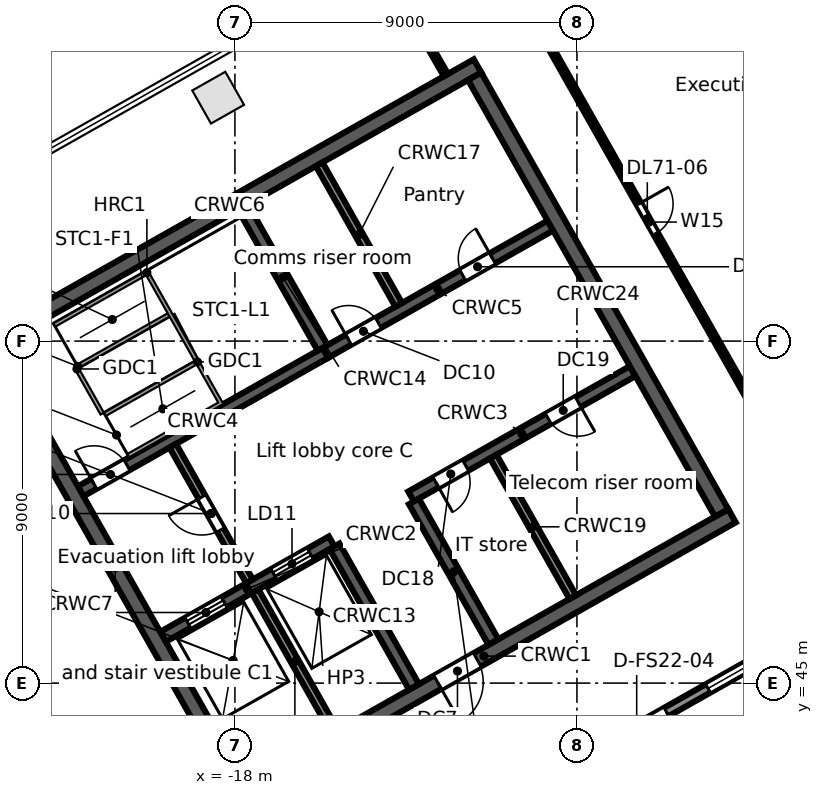
"""IFC4 building model, lengths in metres.
Left out: names, types, materials, properties, quantities, classifications, styles, units other than length and angle.
Written with IfcOpenShell. Run it as: python <this file> out.ifc"""

import sys

from ifc_helpers import new_model, si_unit, direction, frame, frame_2d, origin, origin_2d, place, context, subcontext, project, spatial, rectangle, extrude, element, fill, save


model = new_model("IFC4")
c1 = context("Model", 3, precision=1e-05, world=origin(), true_north=direction((0.0, 1.0)))
c2 = subcontext(c1, "Body", "Model", "MODEL_VIEW")
j1 = project(units=[si_unit("LENGTHUNIT", "METRE"), si_unit("PLANEANGLEUNIT", "RADIAN")], contexts=[c1])
p1 = place(None, origin())
s1 = spatial("IfcSite", under=j1, at=p1, CompositionType="ELEMENT")
p2 = place(p1, origin())
s2 = spatial("IfcBuilding", under=s1, at=p2, CompositionType="ELEMENT")
p3 = place(p2, frame((0.0, 0.0, 316.5)))
s3 = spatial("IfcBuildingStorey", under=s2, at=p3, CompositionType="ELEMENT", Elevation=316.5)
p4 = place(p3, frame((-18.441, 60.406, 0.0), z_axis=(0.0, 0.0, 1.0), x_axis=(-0.87035569594, -0.492423560103, 0.0)))
e1 = element("IfcColumn", 1, at=p4, inside=s3, PredefinedType="COLUMN", context=c2, shape_type="SweptSolid", body=[
    extrude(rectangle(XDim=1.0, YDim=1.0, at=origin_2d()), origin(), (0.0, 0.0, 1.0), 3.8),
])
p5 = place(p3, frame((-3.017, 46.293, 0.0), z_axis=(0.0, 0.0, 1.0), x_axis=(-0.870355474887, -0.492423950812, 0.0)))
e2 = element("IfcWall", 2, at=p5, inside=s3, PredefinedType="STANDARD", context=c2, shape_type="SweptSolid", body=[
    extrude(rectangle(XDim=40.34, YDim=0.25, at=frame_2d((20.17, 0.0))), origin(), (0.0, 0.0, 1.0), 3.52),
])
p6 = place(p5, frame((37.428, 0.0, 0.8)))
e3 = element("IfcOpeningElement", 3, at=p6, cuts=e2, PredefinedType="OPENING", context=c2, shape_type="SweptSolid", body=[
    extrude(rectangle(XDim=2.4, YDim=2.2, at=frame_2d((1.2, 1.1))), frame((0.0, 0.135, 0.0), z_axis=(0.0, -1.0, 0.0), x_axis=(1.0, 0.0, 0.0)), (0.0, 0.0, 1.0), 0.27),
])
p7 = place(p5, frame((34.372, 0.0, 0.0)))
e4 = element("IfcOpeningElement", 4, at=p7, cuts=e2, PredefinedType="OPENING", context=c2, shape_type="SweptSolid", body=[
    extrude(rectangle(XDim=1.8, YDim=2.4, at=frame_2d((0.9, 1.2))), frame((0.0, 0.135, 0.0), z_axis=(0.0, -1.0, 0.0), x_axis=(1.0, 0.0, 0.0)), (0.0, 0.0, 1.0), 0.27),
])
p8 = place(p5, frame((30.716, 0.0, 0.8)))
e5 = element("IfcOpeningElement", 5, at=p8, cuts=e2, PredefinedType="OPENING", context=c2, shape_type="SweptSolid", body=[
    extrude(rectangle(XDim=2.4, YDim=2.2, at=frame_2d((1.2, 1.1))), frame((0.0, 0.135, 0.0), z_axis=(0.0, -1.0, 0.0), x_axis=(1.0, 0.0, 0.0)), (0.0, 0.0, 1.0), 0.27),
])
p9 = place(p5, frame((27.36, 0.0, 0.8)))
e6 = element("IfcOpeningElement", 6, at=p9, cuts=e2, PredefinedType="OPENING", context=c2, shape_type="SweptSolid", body=[
    extrude(rectangle(XDim=2.4, YDim=2.2, at=frame_2d((1.2, 1.1))), frame((0.0, 0.135, 0.0), z_axis=(0.0, -1.0, 0.0), x_axis=(1.0, 0.0, 0.0)), (0.0, 0.0, 1.0), 0.27),
])
p10 = place(p5, frame((24.304, 0.0, 0.0)))
e7 = element("IfcOpeningElement", 7, at=p10, cuts=e2, PredefinedType="OPENING", context=c2, shape_type="SweptSolid", body=[
    extrude(rectangle(XDim=1.8, YDim=2.4, at=frame_2d((0.9, 1.2))), frame((0.0, 0.135, 0.0), z_axis=(0.0, -1.0, 0.0), x_axis=(1.0, 0.0, 0.0)), (0.0, 0.0, 1.0), 0.27),
])
p11 = place(p5, frame((20.648, 0.0, 0.8)))
e8 = element("IfcOpeningElement", 8, at=p11, cuts=e2, PredefinedType="OPENING", context=c2, shape_type="SweptSolid", body=[
    extrude(rectangle(XDim=2.4, YDim=2.2, at=frame_2d((1.2, 1.1))), frame((0.0, 0.135, 0.0), z_axis=(0.0, -1.0, 0.0), x_axis=(1.0, 0.0, 0.0)), (0.0, 0.0, 1.0), 0.27),
])
p12 = place(p5, frame((17.292, 0.0, 0.8)))
e9 = element("IfcOpeningElement", 9, at=p12, cuts=e2, PredefinedType="OPENING", context=c2, shape_type="SweptSolid", body=[
    extrude(rectangle(XDim=2.4, YDim=2.2, at=frame_2d((1.2, 1.1))), frame((0.0, 0.135, 0.0), z_axis=(0.0, -1.0, 0.0), x_axis=(1.0, 0.0, 0.0)), (0.0, 0.0, 1.0), 0.27),
])
p13 = place(p5, frame((14.236, 0.0, 0.0)))
e10 = element("IfcOpeningElement", 10, at=p13, cuts=e2, PredefinedType="OPENING", context=c2, shape_type="SweptSolid", body=[
    extrude(rectangle(XDim=1.8, YDim=2.4, at=frame_2d((0.9, 1.2))), frame((0.0, 0.135, 0.0), z_axis=(0.0, -1.0, 0.0), x_axis=(1.0, 0.0, 0.0)), (0.0, 0.0, 1.0), 0.27),
])
p14 = place(p5, frame((10.58, 0.0, 0.8)))
e11 = element("IfcOpeningElement", 11, at=p14, cuts=e2, PredefinedType="OPENING", context=c2, shape_type="SweptSolid", body=[
    extrude(rectangle(XDim=2.4, YDim=2.2, at=frame_2d((1.2, 1.1))), frame((0.0, 0.135, 0.0), z_axis=(0.0, -1.0, 0.0), x_axis=(1.0, 0.0, 0.0)), (0.0, 0.0, 1.0), 0.27),
])
p15 = place(p5, frame((7.224, 0.0, 0.8)))
e12 = element("IfcOpeningElement", 12, at=p15, cuts=e2, PredefinedType="OPENING", context=c2, shape_type="SweptSolid", body=[
    extrude(rectangle(XDim=2.4, YDim=2.2, at=frame_2d((1.2, 1.1))), frame((0.0, 0.135, 0.0), z_axis=(0.0, -1.0, 0.0), x_axis=(1.0, 0.0, 0.0)), (0.0, 0.0, 1.0), 0.27),
])
p16 = place(p5, frame((4.168, 0.0, 0.0)))
e13 = element("IfcOpeningElement", 13, at=p16, cuts=e2, PredefinedType="OPENING", context=c2, shape_type="SweptSolid", body=[
    extrude(rectangle(XDim=1.8, YDim=2.4, at=frame_2d((0.9, 1.2))), frame((0.0, 0.135, 0.0), z_axis=(0.0, -1.0, 0.0), x_axis=(1.0, 0.0, 0.0)), (0.0, 0.0, 1.0), 0.27),
])
p17 = place(p5, frame((0.512, 0.0, 0.8)))
e14 = element("IfcOpeningElement", 14, at=p17, cuts=e2, PredefinedType="OPENING", context=c2, shape_type="SweptSolid", body=[
    extrude(rectangle(XDim=2.4, YDim=2.2, at=frame_2d((1.2, 1.1))), frame((0.0, 0.135, 0.0), z_axis=(0.0, -1.0, 0.0), x_axis=(1.0, 0.0, 0.0)), (0.0, 0.0, 1.0), 0.27),
])
p18 = place(p3, frame((-17.975, 42.017, 0.0), z_axis=(0.0, 0.0, 1.0), x_axis=(0.87034965173, 0.492434243055, 0.0)))
e15 = element("IfcWall", 15, at=p18, inside=s3, PredefinedType="SOLIDWALL", context=c2, shape_type="SweptSolid", body=[
    extrude(rectangle(XDim=15.0, YDim=0.4, at=frame_2d((7.5, 0.0))), origin(), (0.0, 0.0, 1.0), 3.52),
])
p19 = place(p18, frame((6.1, 0.0, 0.0)))
e16 = element("IfcOpeningElement", 16, at=p19, cuts=e15, PredefinedType="OPENING", context=c2, shape_type="SweptSolid", body=[
    extrude(rectangle(XDim=1.2, YDim=2.1, at=frame_2d((0.6, 1.05))), frame((0.0, 0.21, 0.0), z_axis=(0.0, -1.0, 0.0), x_axis=(1.0, 0.0, 0.0)), (0.0, 0.0, 1.0), 0.42),
])
p20 = place(p3, frame((-19.892, 46.218, 0.0), z_axis=(0.0, 0.0, 1.0), x_axis=(0.870341639186, 0.492448404505, 0.0)))
e17 = element("IfcWall", 17, at=p20, inside=s3, PredefinedType="SOLIDWALL", context=c2, shape_type="SweptSolid", body=[
    extrude(rectangle(XDim=5.1, YDim=0.3, at=frame_2d((2.55, 0.0))), origin(), (0.0, 0.0, 1.0), 3.52),
])
p21 = place(p20, frame((0.75, 0.0, 0.0)))
e18 = element("IfcOpeningElement", 18, at=p21, cuts=e17, PredefinedType="OPENING", context=c2, shape_type="SweptSolid", body=[
    extrude(rectangle(XDim=1.1, YDim=2.1, at=frame_2d((0.55, 1.05))), frame((0.0, 0.16, 0.0), z_axis=(0.0, -1.0, 0.0), x_axis=(1.0, 0.0, 0.0)), (0.0, 0.0, 1.0), 0.32),
])
p22 = place(p20, frame((3.35, 0.0, 0.0)))
e19 = element("IfcOpeningElement", 19, at=p22, cuts=e17, PredefinedType="OPENING", context=c2, shape_type="SweptSolid", body=[
    extrude(rectangle(XDim=1.1, YDim=2.1, at=frame_2d((0.55, 1.05))), frame((0.0, 0.16, 0.0), z_axis=(0.0, -1.0, 0.0), x_axis=(1.0, 0.0, 0.0)), (0.0, 0.0, 1.0), 0.32),
])
p23 = place(p3, frame((-13.365, 49.911, 0.0), z_axis=(0.0, 0.0, 1.0), x_axis=(0.870347618718, 0.492437836272, 0.0)))
e20 = element("IfcWall", 20, at=p23, inside=s3, PredefinedType="SOLIDWALL", context=c2, shape_type="SweptSolid", body=[
    extrude(rectangle(XDim=6.7, YDim=0.3, at=frame_2d((3.35, 0.0))), origin(), (0.0, 0.0, 1.0), 3.52),
])
p24 = place(p23, frame((0.75, 0.0, 0.0)))
e21 = element("IfcOpeningElement", 21, at=p24, cuts=e20, PredefinedType="OPENING", context=c2, shape_type="SweptSolid", body=[
    extrude(rectangle(XDim=0.9, YDim=2.1, at=frame_2d((0.45, 1.05))), frame((0.0, 0.16, 0.0), z_axis=(0.0, -1.0, 0.0), x_axis=(1.0, 0.0, 0.0)), (0.0, 0.0, 1.0), 0.32),
])
p25 = place(p23, frame((4.15, 0.0, 0.0)))
e22 = element("IfcOpeningElement", 22, at=p25, cuts=e20, PredefinedType="OPENING", context=c2, shape_type="SweptSolid", body=[
    extrude(rectangle(XDim=0.9, YDim=2.1, at=frame_2d((0.45, 1.05))), frame((0.0, 0.16, 0.0), z_axis=(0.0, -1.0, 0.0), x_axis=(1.0, 0.0, 0.0)), (0.0, 0.0, 1.0), 0.32),
])
p26 = place(p3, frame((-22.059, 50.047, 0.0), z_axis=(0.0, 0.0, 1.0), x_axis=(0.87035077051, 0.49243226567, 0.0)))
e23 = element("IfcWall", 23, at=p26, inside=s3, PredefinedType="SOLIDWALL", context=c2, shape_type="SweptSolid", body=[
    extrude(rectangle(XDim=7.4, YDim=0.3, at=frame_2d((3.7, 0.0))), origin(), (0.0, 0.0, 1.0), 3.52),
])
p27 = place(p26, frame((0.4, 0.0, 0.0)))
e24 = element("IfcOpeningElement", 24, at=p27, cuts=e23, PredefinedType="OPENING", context=c2, shape_type="SweptSolid", body=[
    extrude(rectangle(XDim=1.0, YDim=2.1, at=frame_2d((0.5, 1.05))), frame((0.0, 0.16, 0.0), z_axis=(0.0, -1.0, 0.0), x_axis=(1.0, 0.0, 0.0)), (0.0, 0.0, 1.0), 0.32),
])
p28 = place(p3, frame((-15.618, 53.691, 0.0), z_axis=(0.0, 0.0, 1.0), x_axis=(0.870362830851, 0.492410948978, 0.0)))
e25 = element("IfcWall", 25, at=p28, inside=s3, PredefinedType="SOLIDWALL", context=c2, shape_type="SweptSolid", body=[
    extrude(rectangle(XDim=6.8, YDim=0.3, at=frame_2d((3.4, 0.0))), origin(), (0.0, 0.0, 1.0), 3.52),
])
p29 = place(p28, frame((0.7, 0.0, 0.0)))
e26 = element("IfcOpeningElement", 26, at=p29, cuts=e25, PredefinedType="OPENING", context=c2, shape_type="SweptSolid", body=[
    extrude(rectangle(XDim=0.9, YDim=2.1, at=frame_2d((0.45, 1.05))), frame((0.0, 0.16, 0.0), z_axis=(0.0, -1.0, 0.0), x_axis=(1.0, 0.0, 0.0)), (0.0, 0.0, 1.0), 0.32),
])
p30 = place(p28, frame((4.15, 0.0, 0.0)))
e27 = element("IfcOpeningElement", 27, at=p30, cuts=e25, PredefinedType="OPENING", context=c2, shape_type="SweptSolid", body=[
    extrude(rectangle(XDim=0.9, YDim=2.1, at=frame_2d((0.45, 1.05))), frame((0.0, 0.16, 0.0), z_axis=(0.0, -1.0, 0.0), x_axis=(1.0, 0.0, 0.0)), (0.0, 0.0, 1.0), 0.32),
])
p31 = place(p3, frame((-24.672, 53.854, 0.0), z_axis=(0.0, 0.0, 1.0), x_axis=(0.870353598469, 0.492427267353, 0.0)))
e28 = element("IfcWall", 28, at=p31, inside=s3, PredefinedType="SOLIDWALL", context=c2, shape_type="SweptSolid", body=[
    extrude(rectangle(XDim=15.0, YDim=0.4, at=frame_2d((7.5, 0.0))), origin(), (0.0, 0.0, 1.0), 3.52),
])
p32 = place(p3, frame((-24.4, 53.779, 0.0), z_axis=(0.0, 0.0, 1.0), x_axis=(0.492421663121, -0.870356769198, 0.0)))
e29 = element("IfcWall", 29, at=p32, inside=s3, PredefinedType="SOLIDWALL", context=c2, shape_type="SweptSolid", body=[
    extrude(rectangle(XDim=13.2, YDim=0.4, at=frame_2d((6.6, 0.0))), origin(), (0.0, 0.0, 1.0), 3.52),
])
p33 = place(p3, frame((-17.469, 47.417, 0.0), z_axis=(0.0, 0.0, 1.0), x_axis=(0.492466057713, -0.870331650579, 0.0)))
e30 = element("IfcWall", 30, at=p33, inside=s3, PredefinedType="SOLIDWALL", context=c2, shape_type="SweptSolid", body=[
    extrude(rectangle(XDim=4.25, YDim=0.2, at=frame_2d((2.125, 0.0))), origin(), (0.0, 0.0, 1.0), 3.52),
])
p34 = place(p3, frame((-19.635, 51.246, 0.0), z_axis=(0.0, 0.0, 1.0), x_axis=(0.492408451753, -0.87036424366, 0.0)))
e31 = element("IfcWall", 31, at=p34, inside=s3, PredefinedType="PARTITIONING", context=c2, shape_type="SweptSolid", body=[
    extrude(rectangle(XDim=4.1, YDim=0.2, at=frame_2d((2.05, 0.0))), origin(), (0.0, 0.0, 1.0), 3.52),
])
p35 = place(p34, frame((1.55, 0.0, 0.0)))
e32 = element("IfcOpeningElement", 32, at=p35, cuts=e31, PredefinedType="OPENING", context=c2, shape_type="SweptSolid", body=[
    extrude(rectangle(XDim=1.0, YDim=2.1, at=frame_2d((0.5, 1.05))), frame((0.0, 0.11, 0.0), z_axis=(0.0, -1.0, 0.0), x_axis=(1.0, 0.0, 0.0)), (0.0, 0.0, 1.0), 0.22),
])
for number, where, z_axis, x_axis in (
    (33, (-15.379, 48.599, 0.0), (0.0, 0.0, 1.0), (0.492, -0.87, 0.0)),
    (34, (-17.785, 57.521, 0.0), (0.0, 0.0, 1.0), (0.492, -0.87, 0.0)),
):
    element("IfcWall", number, at=place(p3, frame(where, z_axis=z_axis, x_axis=x_axis)), inside=s3, PredefinedType="SOLIDWALL", context=c2, shape_type="SweptSolid", body=[
        extrude(rectangle(XDim=4.25, YDim=0.3, at=frame_2d((2.125, 0.0))), origin(), (0.0, 0.0, 1.0), 3.52),
    ])
p36 = place(p3, frame((-13.291, 49.781, 0.0), z_axis=(0.0, 0.0, 1.0), x_axis=(0.492397924348, -0.870370199454, 0.0)))
e35 = element("IfcWall", 35, at=p36, inside=s3, PredefinedType="SOLIDWALL", context=c2, shape_type="SweptSolid", body=[
    extrude(rectangle(XDim=4.25, YDim=0.3, at=frame_2d((2.125, 0.0))), origin(), (0.0, 0.0, 1.0), 3.52),
])
for number, where, z_axis, x_axis in (
    (36, (-15.783, 58.654, 0.0), (0.0, 0.0, 1.0), (0.492, -0.87, 0.0)),
    (37, (-11.202, 50.962, 0.0), (0.0, 0.0, 1.0), (0.492, -0.87, 0.0)),
):
    element("IfcWall", number, at=place(p3, frame(where, z_axis=z_axis, x_axis=x_axis)), inside=s3, PredefinedType="PARTITIONING", context=c2, shape_type="SweptSolid", body=[
        extrude(rectangle(XDim=4.25, YDim=0.2, at=frame_2d((2.125, 0.0))), origin(), (0.0, 0.0, 1.0), 3.52),
    ])
p37 = place(p3, frame((-11.692, 60.968, 0.0), z_axis=(0.0, 0.0, 1.0), x_axis=(0.492421663121, -0.870356769198, 0.0)))
e38 = element("IfcWall", 38, at=p37, inside=s3, PredefinedType="SOLIDWALL", context=c2, shape_type="SweptSolid", body=[
    extrude(rectangle(XDim=13.2, YDim=0.4, at=frame_2d((6.6, 0.0))), origin(), (0.0, 0.0, 1.0), 3.52),
])
p38 = place(p3, frame((-14.141, 63.93, 0.0), z_axis=(0.0, 0.0, 1.0), x_axis=(0.500677851844, -0.865633691969, 0.0)))
e39 = element("IfcWall", 39, at=p38, inside=s3, PredefinedType="PARTITIONING", context=c2, shape_type="SweptSolid", body=[
    extrude(rectangle(XDim=3.384, YDim=0.125, at=frame_2d((1.692, 0.0))), origin(), (0.0, 0.0, 1.0), 2.888),
])
p39 = place(p3, frame((-10.054, 62.355, 0.0), z_axis=(0.0, 0.0, 1.0), x_axis=(0.49244734164, -0.870342240565, 0.0)))
e40 = element("IfcWall", 40, at=p39, inside=s3, PredefinedType="PARTITIONING", context=c2, shape_type="SweptSolid", body=[
    extrude(rectangle(XDim=12.001, YDim=0.125, at=frame_2d((6.0, 0.0))), origin(), (0.0, 0.0, 1.0), 2.7),
])
p40 = place(p39, frame((5.45, 0.0, 0.0)))
e41 = element("IfcOpeningElement", 41, at=p40, cuts=e40, PredefinedType="OPENING", context=c2, shape_type="SweptSolid", body=[
    extrude(rectangle(XDim=0.9, YDim=2.1, at=frame_2d((0.45, 1.05))), frame((0.0, 0.073, 0.0), z_axis=(0.0, -1.0, 0.0), x_axis=(1.0, 0.0, 0.0)), (0.0, 0.0, 1.0), 0.145),
])
p41 = place(p16, origin())
e42 = element("IfcDoor", 42, at=p41, inside=s3, OperationType="DOUBLE_DOOR_SINGLE_SWING", PredefinedType="DOOR", context=c2, shape_type="SweptSolid", body=[
    extrude(rectangle(XDim=1.8, YDim=2.4, at=frame_2d((0.9, 1.2))), frame((0.0, 0.025, 0.0), z_axis=(0.0, -1.0, 0.0), x_axis=(1.0, 0.0, 0.0)), (0.0, 0.0, 1.0), 0.05),
])
fill(e13, e42)
p42 = place(p17, origin())
e43 = element("IfcWindow", 43, at=p42, inside=s3, PartitioningType="SINGLE_PANEL", PredefinedType="WINDOW", context=c2, shape_type="SweptSolid", body=[
    extrude(rectangle(XDim=2.4, YDim=2.2, at=frame_2d((1.2, 1.1))), frame((0.0, 0.03, 0.0), z_axis=(0.0, -1.0, 0.0), x_axis=(1.0, 0.0, 0.0)), (0.0, 0.0, 1.0), 0.06),
])
fill(e14, e43)
p43 = place(p21, origin())
e44 = element("IfcDoor", 44, at=p43, inside=s3, OperationType="DOUBLE_DOOR_SLIDING", PredefinedType="DOOR", context=c2, shape_type="SweptSolid", body=[
    extrude(rectangle(XDim=1.1, YDim=2.1, at=frame_2d((0.55, 1.05))), frame((0.0, 0.025, 0.0), z_axis=(0.0, -1.0, 0.0), x_axis=(1.0, 0.0, 0.0)), (0.0, 0.0, 1.0), 0.05),
])
fill(e18, e44)
p44 = place(p22, origin())
e45 = element("IfcDoor", 45, at=p44, inside=s3, OperationType="DOUBLE_DOOR_SLIDING", PredefinedType="DOOR", context=c2, shape_type="SweptSolid", body=[
    extrude(rectangle(XDim=1.1, YDim=2.1, at=frame_2d((0.55, 1.05))), frame((0.0, 0.025, 0.0), z_axis=(0.0, -1.0, 0.0), x_axis=(1.0, 0.0, 0.0)), (0.0, 0.0, 1.0), 0.05),
])
fill(e19, e45)
p45 = place(p27, origin())
e46 = element("IfcDoor", 46, at=p45, inside=s3, OperationType="SINGLE_SWING_LEFT", PredefinedType="DOOR", context=c2, shape_type="SweptSolid", body=[
    extrude(rectangle(XDim=1.0, YDim=2.1, at=frame_2d((0.5, 1.05))), frame((0.0, 0.025, 0.0), z_axis=(0.0, -1.0, 0.0), x_axis=(1.0, 0.0, 0.0)), (0.0, 0.0, 1.0), 0.05),
])
fill(e24, e46)
p46 = place(p35, frame((1.0, 0.0, 0.0), z_axis=(0.0, 0.0, 1.0), x_axis=(-1.0, 0.0, 0.0)))
e47 = element("IfcDoor", 47, at=p46, inside=s3, OperationType="SINGLE_SWING_RIGHT", PredefinedType="DOOR", context=c2, shape_type="SweptSolid", body=[
    extrude(rectangle(XDim=1.0, YDim=2.1, at=frame_2d((0.5, 1.05))), frame((0.0, 0.025, 0.0), z_axis=(0.0, -1.0, 0.0), x_axis=(1.0, 0.0, 0.0)), (0.0, 0.0, 1.0), 0.05),
])
fill(e32, e47)
p47 = place(p19, frame((1.2, 0.0, 0.0), z_axis=(0.0, 0.0, 1.0), x_axis=(-1.0, 0.0, 0.0)))
e48 = element("IfcDoor", 48, at=p47, inside=s3, OperationType="SINGLE_SWING_RIGHT", PredefinedType="DOOR", context=c2, shape_type="SweptSolid", body=[
    extrude(rectangle(XDim=1.2, YDim=2.1, at=frame_2d((0.6, 1.05))), frame((0.0, 0.025, 0.0), z_axis=(0.0, -1.0, 0.0), x_axis=(1.0, 0.0, 0.0)), (0.0, 0.0, 1.0), 0.05),
])
fill(e16, e48)
p48 = place(p29, origin())
e49 = element("IfcDoor", 49, at=p48, inside=s3, OperationType="SINGLE_SWING_LEFT", PredefinedType="DOOR", context=c2, shape_type="SweptSolid", body=[
    extrude(rectangle(XDim=0.9, YDim=2.1, at=frame_2d((0.45, 1.05))), frame((0.0, 0.025, 0.0), z_axis=(0.0, -1.0, 0.0), x_axis=(1.0, 0.0, 0.0)), (0.0, 0.0, 1.0), 0.05),
])
fill(e26, e49)
p49 = place(p30, origin())
e50 = element("IfcDoor", 50, at=p49, inside=s3, OperationType="SINGLE_SWING_RIGHT", PredefinedType="DOOR", context=c2, shape_type="SweptSolid", body=[
    extrude(rectangle(XDim=0.9, YDim=2.1, at=frame_2d((0.45, 1.05))), frame((0.0, 0.025, 0.0), z_axis=(0.0, -1.0, 0.0), x_axis=(1.0, 0.0, 0.0)), (0.0, 0.0, 1.0), 0.05),
])
fill(e27, e50)
p50 = place(p24, frame((0.9, 0.0, 0.0), z_axis=(0.0, 0.0, 1.0), x_axis=(-1.0, 0.0, 0.0)))
e51 = element("IfcDoor", 51, at=p50, inside=s3, OperationType="SINGLE_SWING_RIGHT", PredefinedType="DOOR", context=c2, shape_type="SweptSolid", body=[
    extrude(rectangle(XDim=0.9, YDim=2.1, at=frame_2d((0.45, 1.05))), frame((0.0, 0.025, 0.0), z_axis=(0.0, -1.0, 0.0), x_axis=(1.0, 0.0, 0.0)), (0.0, 0.0, 1.0), 0.05),
])
fill(e21, e51)
p51 = place(p25, frame((0.9, 0.0, 0.0), z_axis=(0.0, 0.0, 1.0), x_axis=(-1.0, 0.0, 0.0)))
e52 = element("IfcDoor", 52, at=p51, inside=s3, OperationType="SINGLE_SWING_LEFT", PredefinedType="DOOR", context=c2, shape_type="SweptSolid", body=[
    extrude(rectangle(XDim=0.9, YDim=2.1, at=frame_2d((0.45, 1.05))), frame((0.0, 0.025, 0.0), z_axis=(0.0, -1.0, 0.0), x_axis=(1.0, 0.0, 0.0)), (0.0, 0.0, 1.0), 0.05),
])
fill(e22, e52)
p52 = place(p40, origin())
e53 = element("IfcDoor", 53, at=p52, inside=s3, OperationType="SINGLE_SWING_LEFT", PredefinedType="DOOR", context=c2, shape_type="SweptSolid", body=[
    extrude(rectangle(XDim=0.9, YDim=2.1, at=frame_2d((0.45, 1.05))), frame((0.0, 0.025, 0.0), z_axis=(0.0, -1.0, 0.0), x_axis=(1.0, 0.0, 0.0)), (0.0, 0.0, 1.0), 0.05),
])
fill(e41, e53)
save(model, sys.argv[1])
